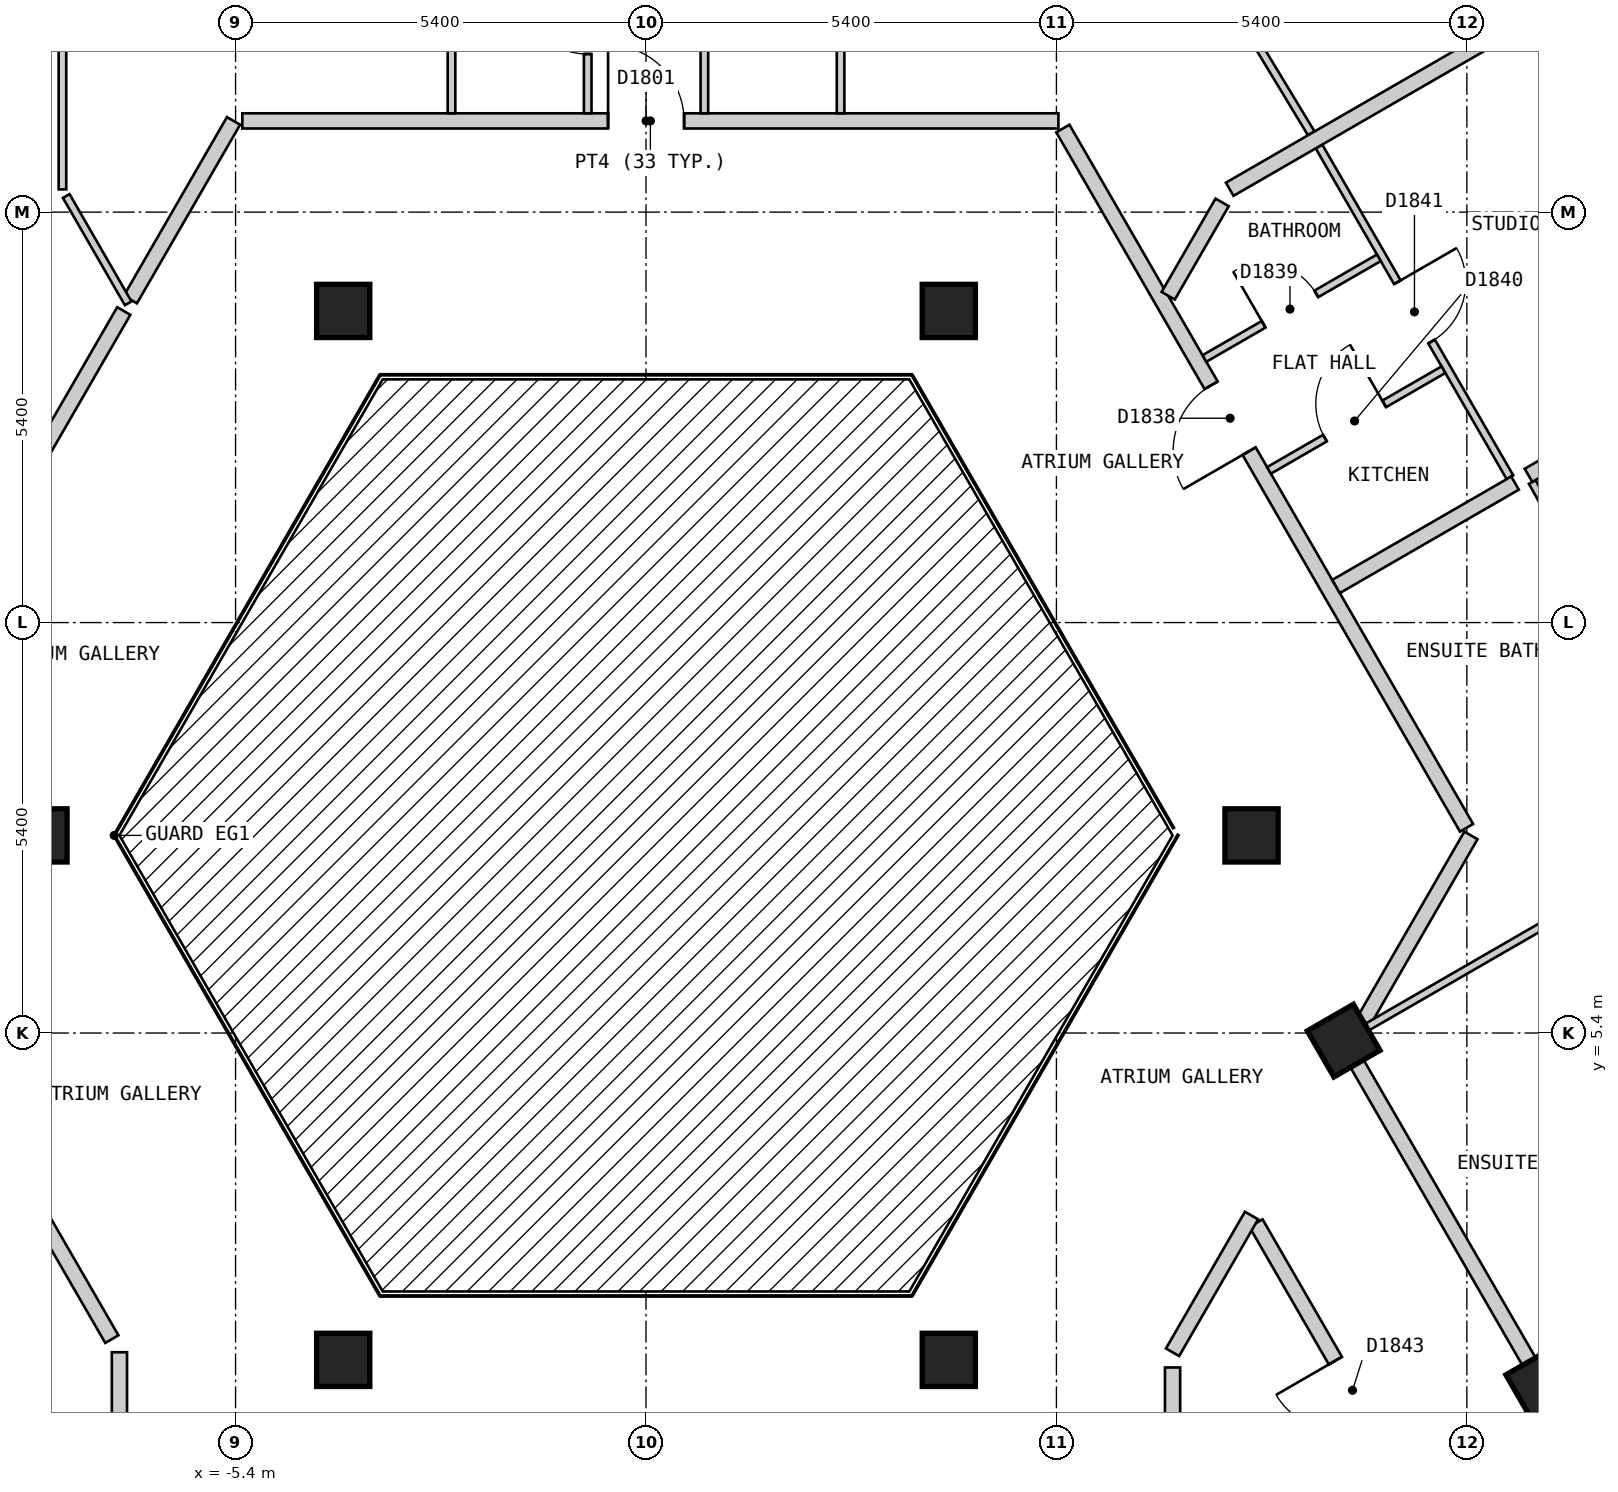
"""IFC4 building model, lengths in metres.
Left out: names, types, materials, properties, quantities, classifications, styles, units other than length and angle.
Written with IfcOpenShell. Run it as: python <this file> out.ifc"""

import sys

from ifc_helpers import new_model, si_unit, direction, frame, frame_2d, origin, origin_2d, place, context, subcontext, project, spatial, rectangle, extrude, element, fill, save


model = new_model("IFC4")
c1 = context("Model", 3, precision=1e-05, world=origin(), true_north=direction((0.0, 1.0)))
c2 = subcontext(c1, "Body", "Model", "MODEL_VIEW")
j1 = project(units=[si_unit("LENGTHUNIT", "METRE"), si_unit("PLANEANGLEUNIT", "RADIAN")], contexts=[c1])
p1 = place(None, origin())
s1 = spatial("IfcSite", under=j1, at=p1, CompositionType="ELEMENT")
p2 = place(p1, origin())
s2 = spatial("IfcBuilding", under=s1, at=p2, CompositionType="ELEMENT")
p3 = place(p2, frame((0.0, 0.0, 208.8)))
s3 = spatial("IfcBuildingStorey", under=s2, at=p3, CompositionType="ELEMENT", Elevation=208.8)
for number, where, z_axis, x_axis in (
    (1, (11.792, 0.775, 0.0), (0.0, 0.0, 1.0), (-0.5, 0.866, 0.0)),
    (2, (3.984, 1.1, 0.0), (0.0, 0.0, 1.0), (1.0, 0.0, 0.0)),
    (3, (9.179, 5.3, 0.0), (0.0, 0.0, 1.0), (-0.5, 0.866, 0.0)),
    (4, (7.967, 8.0, 0.0), (0.0, 0.0, 1.0), (1.0, 0.0, 0.0)),
    (5, (3.984, 14.9, 0.0), (0.0, 0.0, 1.0), (1.0, 0.0, 0.0)),
    (6, (-3.984, 14.9, 0.0), (0.0, 0.0, 1.0), (1.0, 0.0, 0.0)),
    (7, (-7.967, 8.0, 0.0), (0.0, 0.0, 1.0), (1.0, 0.0, 0.0)),
    (8, (-3.984, 1.1, 0.0), (0.0, 0.0, 1.0), (1.0, 0.0, 0.0)),
):
    element("IfcColumn", number, at=place(p3, frame(where, z_axis=z_axis, x_axis=x_axis)), inside=s3, PredefinedType="COLUMN", context=c2, shape_type="SweptSolid", body=[
        extrude(rectangle(XDim=0.7, YDim=0.7, at=origin_2d()), origin(), (0.0, 0.0, 1.0), 3.0),
    ])
p4 = place(p3, frame((-7.909, 2.898, 0.0), z_axis=(0.0, 0.0, 1.0), x_axis=(0.50019444547, -0.865913111531, 0.0)))
e9 = element("IfcWall", 9, at=p4, inside=s3, PredefinedType="PARTITIONING", context=c2, shape_type="SweptSolid", body=[
    extrude(rectangle(XDim=1.761, YDim=0.2, at=frame_2d((0.88, 0.0))), origin(), (0.0, 0.0, 1.0), 2.7),
])
p5 = place(p3, frame((8.026, 2.899, 0.0), z_axis=(0.0, 0.0, 1.0), x_axis=(0.499986018985, -0.866033475577, 0.0)))
e10 = element("IfcWall", 10, at=p5, inside=s3, PredefinedType="PARTITIONING", context=c2, shape_type="SweptSolid", body=[
    extrude(rectangle(XDim=5.078, YDim=0.2, at=frame_2d((2.539, 0.0))), origin(), (0.0, 0.0, 1.0), 2.7),
])
p6 = place(p5, frame((2.089, 0.0, 0.0)))
e11 = element("IfcOpeningElement", 11, at=p6, cuts=e10, PredefinedType="OPENING", context=c2, shape_type="SweptSolid", body=[
    extrude(rectangle(XDim=0.9, YDim=2.1, at=frame_2d((0.45, 1.05))), frame((0.0, 0.11, 0.0), z_axis=(0.0, -1.0, 0.0), x_axis=(1.0, 0.0, 0.0)), (0.0, 0.0, 1.0), 0.22),
])
p7 = place(p3, frame((9.238, 5.2, 0.0), z_axis=(0.0, 0.0, 1.0), x_axis=(0.500025705601, -0.86601056214, 0.0)))
e12 = element("IfcWall", 12, at=p7, inside=s3, PredefinedType="PARTITIONING", context=c2, shape_type="SweptSolid", body=[
    extrude(rectangle(XDim=7.735, YDim=0.2, at=frame_2d((3.868, 0.0))), origin(), (0.0, 0.0, 1.0), 2.7),
])
p8 = place(p3, frame((5.485, 17.3, 0.0), z_axis=(0.0, 0.0, 1.0), x_axis=(0.499943285704, -0.866058145322, 0.0)))
e13 = element("IfcWall", 13, at=p8, inside=s3, PredefinedType="PARTITIONING", context=c2, shape_type="SweptSolid", body=[
    extrude(rectangle(XDim=10.623, YDim=0.2, at=frame_2d((5.312, 0.0))), origin(), (0.0, 0.0, 1.0), 2.7),
])
p9 = place(p8, frame((3.901, 0.0, 0.0)))
e14 = element("IfcOpeningElement", 14, at=p9, cuts=e13, PredefinedType="OPENING", context=c2, shape_type="SweptSolid", body=[
    extrude(rectangle(XDim=1.0, YDim=2.1, at=frame_2d((0.5, 1.05))), frame((0.0, 0.11, 0.0), z_axis=(0.0, -1.0, 0.0), x_axis=(1.0, 0.0, 0.0)), (0.0, 0.0, 1.0), 0.22),
])
p10 = place(p3, frame((6.928, 1.0, 0.0), z_axis=(0.0, 0.0, 1.0), x_axis=(0.0, -1.0, 0.0)))
e15 = element("IfcWall", 15, at=p10, inside=s3, PredefinedType="PARTITIONING", context=c2, shape_type="SweptSolid", body=[
    extrude(rectangle(XDim=3.699, YDim=0.2, at=frame_2d((1.85, 0.0))), origin(), (0.0, 0.0, 1.0), 2.7),
])
p11 = place(p3, frame((-5.311, 17.4, 0.0), z_axis=(0.0, 0.0, 1.0), x_axis=(1.0, 0.0, 0.0)))
e16 = element("IfcWall", 16, at=p11, inside=s3, PredefinedType="PARTITIONING", context=c2, shape_type="SweptSolid", body=[
    extrude(rectangle(XDim=10.737, YDim=0.2, at=frame_2d((5.369, 0.0))), origin(), (0.0, 0.0, 1.0), 2.7),
])
p12 = place(p11, frame((4.812, 0.0, 0.0)))
e17 = element("IfcOpeningElement", 17, at=p12, cuts=e16, PredefinedType="OPENING", context=c2, shape_type="SweptSolid", body=[
    extrude(rectangle(XDim=1.0, YDim=2.1, at=frame_2d((0.5, 1.05))), frame((0.0, 0.11, 0.0), z_axis=(0.0, -1.0, 0.0), x_axis=(1.0, 0.0, 0.0)), (0.0, 0.0, 1.0), 0.22),
])
p13 = place(p3, frame((6.928, 1.2, 0.0), z_axis=(0.0, 0.0, 1.0), x_axis=(0.500132712588, 0.865948768577, 0.0)))
e18 = element("IfcWall", 18, at=p13, inside=s3, PredefinedType="PARTITIONING", context=c2, shape_type="SweptSolid", body=[
    extrude(rectangle(XDim=2.078, YDim=0.2, at=frame_2d((1.039, 0.0))), origin(), (0.0, 0.0, 1.0), 2.7),
])
p14 = place(p3, frame((9.404, 5.487, 0.0), z_axis=(0.0, 0.0, 1.0), x_axis=(0.499768590677, 0.866158966803, 0.0)))
e19 = element("IfcWall", 19, at=p14, inside=s3, PredefinedType="PARTITIONING", context=c2, shape_type="SweptSolid", body=[
    extrude(rectangle(XDim=2.901, YDim=0.2, at=frame_2d((1.451, 0.0))), origin(), (0.0, 0.0, 1.0), 2.7),
])
p15 = place(p3, frame((-10.826, 8.048, 0.0), z_axis=(0.0, 0.0, 1.0), x_axis=(0.499953104851, 0.866052477019, 0.0)))
e20 = element("IfcWall", 20, at=p15, inside=s3, PredefinedType="PARTITIONING", context=c2, shape_type="SweptSolid", body=[
    extrude(rectangle(XDim=7.91, YDim=0.2, at=frame_2d((3.955, 0.0))), origin(), (0.0, 0.0, 1.0), 2.7),
])
p16 = place(p15, frame((0.603, 0.0, 0.0)))
e21 = element("IfcOpeningElement", 21, at=p16, cuts=e20, PredefinedType="OPENING", context=c2, shape_type="SweptSolid", body=[
    extrude(rectangle(XDim=1.0, YDim=2.1, at=frame_2d((0.5, 1.05))), frame((0.0, 0.11, 0.0), z_axis=(0.0, -1.0, 0.0), x_axis=(1.0, 0.0, 0.0)), (0.0, 0.0, 1.0), 0.22),
])
p17 = place(p3, frame((-6.784, 15.05, 0.0), z_axis=(0.0, 0.0, 1.0), x_axis=(0.500067724834, 0.865986299303, 0.0)))
e22 = element("IfcWall", 22, at=p17, inside=s3, PredefinedType="PARTITIONING", context=c2, shape_type="SweptSolid", body=[
    extrude(rectangle(XDim=2.713, YDim=0.2, at=frame_2d((1.357, 0.0))), origin(), (0.0, 0.0, 1.0), 2.7),
])
p18 = place(p3, frame((-6.928, -2.799, 0.0), z_axis=(0.0, 0.0, 1.0), x_axis=(0.0, 1.0, 0.0)))
e23 = element("IfcWall", 23, at=p18, inside=s3, PredefinedType="PARTITIONING", context=c2, shape_type="SweptSolid", body=[
    extrude(rectangle(XDim=3.999, YDim=0.2, at=frame_2d((2.0, 0.0))), origin(), (0.0, 0.0, 1.0), 2.7),
])
p19 = place(p3, frame((7.033, 20.077, 0.0), z_axis=(0.0, 0.0, 1.0), x_axis=(0.517918779664, -0.855429797044, 0.0)))
e24 = element("IfcWall", 24, at=p19, inside=s3, PredefinedType="PARTITIONING", context=c2, shape_type="SweptSolid", body=[
    extrude(rectangle(XDim=3.321, YDim=0.1, at=frame_2d((1.661, 0.0))), origin(), (0.0, 0.0, 1.0), 2.7),
])
p20 = place(p3, frame((-7.628, 16.412, 0.0), z_axis=(0.0, 0.0, 1.0), x_axis=(0.499843439945, -0.866115774908, 0.0)))
e25 = element("IfcWall", 25, at=p20, inside=s3, PredefinedType="PARTITIONING", context=c2, shape_type="SweptSolid", body=[
    extrude(rectangle(XDim=1.63, YDim=0.1, at=frame_2d((0.815, 0.0))), origin(), (0.0, 0.0, 1.0), 2.7),
])
p21 = place(p3, frame((8.854, 17.064, 0.0), z_axis=(0.0, 0.0, 1.0), x_axis=(0.500042049778, -0.866001124973, 0.0)))
e26 = element("IfcWall", 26, at=p21, inside=s3, PredefinedType="PARTITIONING", context=c2, shape_type="SweptSolid", body=[
    extrude(rectangle(XDim=5.025, YDim=0.1, at=frame_2d((2.513, 0.0))), origin(), (0.0, 0.0, 1.0), 2.7),
])
p22 = place(p21, frame((2.063, 0.0, 0.0)))
e27 = element("IfcOpeningElement", 27, at=p22, cuts=e26, PredefinedType="OPENING", context=c2, shape_type="SweptSolid", body=[
    extrude(rectangle(XDim=0.9, YDim=2.1, at=frame_2d((0.45, 1.05))), frame((0.0, 0.06, 0.0), z_axis=(0.0, -1.0, 0.0), x_axis=(1.0, 0.0, 0.0)), (0.0, 0.0, 1.0), 0.12),
])
p23 = place(p3, frame((11.66, 12.65, 0.0), z_axis=(0.0, 0.0, 1.0), x_axis=(0.488650242737, -0.872479764965, 0.0)))
e28 = element("IfcWall", 28, at=p23, inside=s3, PredefinedType="PARTITIONING", context=c2, shape_type="SweptSolid", body=[
    extrude(rectangle(XDim=5.075, YDim=0.1, at=frame_2d((2.538, 0.0))), origin(), (0.0, 0.0, 1.0), 2.7),
])
p24 = place(p23, frame((2.113, 0.0, 0.0)))
e29 = element("IfcOpeningElement", 29, at=p24, cuts=e28, PredefinedType="OPENING", context=c2, shape_type="SweptSolid", body=[
    extrude(rectangle(XDim=0.8, YDim=2.1, at=frame_2d((0.4, 1.05))), frame((0.0, 0.06, 0.0), z_axis=(0.0, -1.0, 0.0), x_axis=(1.0, 0.0, 0.0)), (0.0, 0.0, 1.0), 0.12),
])
p25 = place(p3, frame((-2.559, 20.17, 0.0), z_axis=(0.0, 0.0, 1.0), x_axis=(0.0, -1.0, 0.0)))
e30 = element("IfcWall", 30, at=p25, inside=s3, PredefinedType="PARTITIONING", context=c2, shape_type="SweptSolid", body=[
    extrude(rectangle(XDim=2.67, YDim=0.1, at=frame_2d((1.335, 0.0))), origin(), (0.0, 0.0, 1.0), 2.7),
])
p26 = place(p3, frame((2.56, 20.03, 0.0), z_axis=(0.0, 0.0, 1.0), x_axis=(0.0, -1.0, 0.0)))
e31 = element("IfcWall", 31, at=p26, inside=s3, PredefinedType="PARTITIONING", context=c2, shape_type="SweptSolid", body=[
    extrude(rectangle(XDim=2.53, YDim=0.1, at=frame_2d((1.265, 0.0))), origin(), (0.0, 0.0, 1.0), 2.7),
])
p27 = place(p3, frame((0.768, 17.5, 0.0), z_axis=(0.0, 0.0, 1.0), x_axis=(0.0, 1.0, 0.0)))
e32 = element("IfcWall", 32, at=p27, inside=s3, PredefinedType="PARTITIONING", context=c2, shape_type="SweptSolid", body=[
    extrude(rectangle(XDim=2.51, YDim=0.1, at=frame_2d((1.255, 0.0))), origin(), (0.0, 0.0, 1.0), 2.7),
])
p28 = place(p27, frame((0.83, 0.0, 0.0)))
e33 = element("IfcOpeningElement", 33, at=p28, cuts=e32, PredefinedType="OPENING", context=c2, shape_type="SweptSolid", body=[
    extrude(rectangle(XDim=0.8, YDim=2.1, at=frame_2d((0.4, 1.05))), frame((0.0, 0.06, 0.0), z_axis=(0.0, -1.0, 0.0), x_axis=(1.0, 0.0, 0.0)), (0.0, 0.0, 1.0), 0.12),
])
p29 = place(p3, frame((-7.678, 16.499, 0.0), z_axis=(0.0, 0.0, 1.0), x_axis=(0.0, 1.0, 0.0)))
e34 = element("IfcWall", 34, at=p29, inside=s3, PredefinedType="PARTITIONING", context=c2, shape_type="SweptSolid", body=[
    extrude(rectangle(XDim=5.801, YDim=0.1, at=frame_2d((2.9, 0.0))), origin(), (0.0, 0.0, 1.0), 2.7),
])
p30 = place(p29, frame((3.44, 0.0, 0.0)))
e35 = element("IfcOpeningElement", 35, at=p30, cuts=e34, PredefinedType="OPENING", context=c2, shape_type="SweptSolid", body=[
    extrude(rectangle(XDim=0.9, YDim=2.1, at=frame_2d((0.45, 1.05))), frame((0.0, 0.06, 0.0), z_axis=(0.0, -1.0, 0.0), x_axis=(1.0, 0.0, 0.0)), (0.0, 0.0, 1.0), 0.12),
])
p31 = place(p3, frame((-0.767, 17.5, 0.0), z_axis=(0.0, 0.0, 1.0), x_axis=(0.0, 1.0, 0.0)))
e36 = element("IfcWall", 36, at=p31, inside=s3, PredefinedType="PARTITIONING", context=c2, shape_type="SweptSolid", body=[
    extrude(rectangle(XDim=2.559, YDim=0.1, at=frame_2d((1.28, 0.0))), origin(), (0.0, 0.0, 1.0), 2.7),
])
p32 = place(p31, frame((0.78, 0.0, 0.0)))
e37 = element("IfcOpeningElement", 37, at=p32, cuts=e36, PredefinedType="OPENING", context=c2, shape_type="SweptSolid", body=[
    extrude(rectangle(XDim=0.9, YDim=2.1, at=frame_2d((0.45, 1.05))), frame((0.0, 0.06, 0.0), z_axis=(0.0, -1.0, 0.0), x_axis=(1.0, 0.0, 0.0)), (0.0, 0.0, 1.0), 0.12),
])
p33 = place(p3, frame((9.354, 5.401, 0.0), z_axis=(0.0, 0.0, 1.0), x_axis=(0.866018411306, 0.500012111133, 0.0)))
e38 = element("IfcWall", 38, at=p33, inside=s3, PredefinedType="PARTITIONING", context=c2, shape_type="SweptSolid", body=[
    extrude(rectangle(XDim=9.898, YDim=0.1, at=frame_2d((4.949, 0.0))), origin(), (0.0, 0.0, 1.0), 2.7),
])
p34 = place(p33, frame((7.277, 0.0, 0.0)))
e39 = element("IfcOpeningElement", 39, at=p34, cuts=e38, PredefinedType="OPENING", context=c2, shape_type="SweptSolid", body=[
    extrude(rectangle(XDim=0.9, YDim=2.1, at=frame_2d((0.45, 1.05))), frame((0.0, 0.06, 0.0), z_axis=(0.0, -1.0, 0.0), x_axis=(1.0, 0.0, 0.0)), (0.0, 0.0, 1.0), 0.12),
])
p35 = place(p3, frame((8.197, 12.802, 0.0), z_axis=(0.0, 0.0, 1.0), x_axis=(0.866029095148, 0.499993606316, 0.0)))
e40 = element("IfcWall", 40, at=p35, inside=s3, PredefinedType="PARTITIONING", context=c2, shape_type="SweptSolid", body=[
    extrude(rectangle(XDim=2.65, YDim=0.1, at=frame_2d((1.325, 0.0))), origin(), (0.0, 0.0, 1.0), 2.7),
])
p36 = place(p35, frame((0.85, 0.0, 0.0)))
e41 = element("IfcOpeningElement", 41, at=p36, cuts=e40, PredefinedType="OPENING", context=c2, shape_type="SweptSolid", body=[
    extrude(rectangle(XDim=0.9, YDim=2.1, at=frame_2d((0.45, 1.05))), frame((0.0, 0.06, 0.0), z_axis=(0.0, -1.0, 0.0), x_axis=(1.0, 0.0, 0.0)), (0.0, 0.0, 1.0), 0.12),
])
p37 = place(p3, frame((7.347, 14.274, 0.0), z_axis=(0.0, 0.0, 1.0), x_axis=(0.86601223543, 0.500022807565, 0.0)))
e42 = element("IfcWall", 42, at=p37, inside=s3, PredefinedType="PARTITIONING", context=c2, shape_type="SweptSolid", body=[
    extrude(rectangle(XDim=2.65, YDim=0.1, at=frame_2d((1.325, 0.0))), origin(), (0.0, 0.0, 1.0), 2.7),
])
p38 = place(p37, frame((0.9, 0.0, 0.0)))
e43 = element("IfcOpeningElement", 43, at=p38, cuts=e42, PredefinedType="OPENING", context=c2, shape_type="SweptSolid", body=[
    extrude(rectangle(XDim=0.8, YDim=2.1, at=frame_2d((0.4, 1.05))), frame((0.0, 0.06, 0.0), z_axis=(0.0, -1.0, 0.0), x_axis=(1.0, 0.0, 0.0)), (0.0, 0.0, 1.0), 0.12),
])
p39 = place(p3, frame((6.871, 15.1, 0.0), z_axis=(0.0, 0.0, 1.0), x_axis=(0.50006528296, 0.865987709369, 0.0)))
e44 = element("IfcWall", 44, at=p39, inside=s3, PredefinedType="PARTITIONING", context=c2, shape_type="SweptSolid", body=[
    extrude(rectangle(XDim=1.418, YDim=0.2, at=frame_2d((0.709, 0.0))), origin(), (0.0, 0.0, 1.0), 2.7),
])
p40 = place(p3, frame((9.079, 11.275, 0.0), z_axis=(0.0, 0.0, 1.0), x_axis=(0.865952340496, 0.500126527981, 0.0)))
e45 = element("IfcWall", 45, at=p40, inside=s3, PredefinedType="PARTITIONING", context=c2, shape_type="SweptSolid", body=[
    extrude(rectangle(XDim=2.719, YDim=0.2, at=frame_2d((1.36, 0.0))), origin(), (0.0, 0.0, 1.0), 2.7),
])
p41 = place(p3, frame((11.611, 12.737, 0.0), z_axis=(0.0, 0.0, 1.0), x_axis=(0.866017282483, 0.500014066243, 0.0)))
e46 = element("IfcWall", 46, at=p41, inside=s3, PredefinedType="PARTITIONING", context=c2, shape_type="SweptSolid", body=[
    extrude(rectangle(XDim=4.276, YDim=0.2, at=frame_2d((2.138, 0.0))), origin(), (0.0, 0.0, 1.0), 2.7),
])
p42 = place(p3, frame((7.68, 16.501, 0.0), z_axis=(0.0, 0.0, 1.0), x_axis=(0.86602149507, 0.500006770031, 0.0)))
e47 = element("IfcWall", 47, at=p42, inside=s3, PredefinedType="PARTITIONING", context=c2, shape_type="SweptSolid", body=[
    extrude(rectangle(XDim=5.798, YDim=0.2, at=frame_2d((2.899, 0.0))), origin(), (0.0, 0.0, 1.0), 2.7),
])
p43 = place(p3, frame((-11.417, 12.625, 0.0), z_axis=(0.0, 0.0, 1.0), x_axis=(0.500007885066, 0.866020851292, 0.0)))
e48 = element("IfcWall", 48, at=p43, inside=s3, PredefinedType="PARTITIONING", context=c2, shape_type="SweptSolid", body=[
    extrude(rectangle(XDim=7.33, YDim=0.1, at=frame_2d((3.665, 0.0))), origin(), (0.0, 0.0, 1.0), 2.7),
])
p44 = place(p43, frame((3.328, 0.0, 0.0)))
e49 = element("IfcOpeningElement", 49, at=p44, cuts=e48, PredefinedType="OPENING", context=c2, shape_type="SweptSolid", body=[
    extrude(rectangle(XDim=0.8, YDim=2.1, at=frame_2d((0.4, 1.05))), frame((0.0, 0.06, 0.0), z_axis=(0.0, -1.0, 0.0), x_axis=(1.0, 0.0, 0.0)), (0.0, 0.0, 1.0), 0.12),
])
p45 = place(p12, origin())
e50 = element("IfcDoor", 50, at=p45, inside=s3, OperationType="SINGLE_SWING_LEFT", PredefinedType="DOOR", context=c2, shape_type="SweptSolid", body=[
    extrude(rectangle(XDim=1.0, YDim=2.1, at=frame_2d((0.5, 1.05))), frame((0.0, 0.025, 0.0), z_axis=(0.0, -1.0, 0.0), x_axis=(1.0, 0.0, 0.0)), (0.0, 0.0, 1.0), 0.05),
])
fill(e17, e50)
p46 = place(p32, origin())
e51 = element("IfcDoor", 51, at=p46, inside=s3, OperationType="SINGLE_SWING_RIGHT", PredefinedType="DOOR", context=c2, shape_type="SweptSolid", body=[
    extrude(rectangle(XDim=0.9, YDim=2.1, at=frame_2d((0.45, 1.05))), frame((0.0, 0.025, 0.0), z_axis=(0.0, -1.0, 0.0), x_axis=(1.0, 0.0, 0.0)), (0.0, 0.0, 1.0), 0.05),
])
fill(e37, e51)
p47 = place(p9, origin())
e52 = element("IfcDoor", 52, at=p47, inside=s3, OperationType="SINGLE_SWING_RIGHT", PredefinedType="DOOR", context=c2, shape_type="SweptSolid", body=[
    extrude(rectangle(XDim=1.0, YDim=2.1, at=frame_2d((0.5, 1.05))), frame((0.0, 0.025, 0.0), z_axis=(0.0, -1.0, 0.0), x_axis=(1.0, 0.0, 0.0)), (0.0, 0.0, 1.0), 0.05),
])
fill(e14, e52)
p48 = place(p38, origin())
e53 = element("IfcDoor", 53, at=p48, inside=s3, OperationType="SINGLE_SWING_LEFT", PredefinedType="DOOR", context=c2, shape_type="SweptSolid", body=[
    extrude(rectangle(XDim=0.8, YDim=2.1, at=frame_2d((0.4, 1.05))), frame((0.0, 0.025, 0.0), z_axis=(0.0, -1.0, 0.0), x_axis=(1.0, 0.0, 0.0)), (0.0, 0.0, 1.0), 0.05),
])
fill(e43, e53)
p49 = place(p36, origin())
e54 = element("IfcDoor", 54, at=p49, inside=s3, OperationType="SINGLE_SWING_RIGHT", PredefinedType="DOOR", context=c2, shape_type="SweptSolid", body=[
    extrude(rectangle(XDim=0.9, YDim=2.1, at=frame_2d((0.45, 1.05))), frame((0.0, 0.025, 0.0), z_axis=(0.0, -1.0, 0.0), x_axis=(1.0, 0.0, 0.0)), (0.0, 0.0, 1.0), 0.05),
])
fill(e41, e54)
p50 = place(p22, origin())
e55 = element("IfcDoor", 55, at=p50, inside=s3, OperationType="SINGLE_SWING_LEFT", PredefinedType="DOOR", context=c2, shape_type="SweptSolid", body=[
    extrude(rectangle(XDim=0.9, YDim=2.1, at=frame_2d((0.45, 1.05))), frame((0.0, 0.025, 0.0), z_axis=(0.0, -1.0, 0.0), x_axis=(1.0, 0.0, 0.0)), (0.0, 0.0, 1.0), 0.05),
])
fill(e27, e55)
p51 = place(p6, origin())
e56 = element("IfcDoor", 56, at=p51, inside=s3, OperationType="SINGLE_SWING_LEFT", PredefinedType="DOOR", context=c2, shape_type="SweptSolid", body=[
    extrude(rectangle(XDim=0.9, YDim=2.1, at=frame_2d((0.45, 1.05))), frame((0.0, 0.025, 0.0), z_axis=(0.0, -1.0, 0.0), x_axis=(1.0, 0.0, 0.0)), (0.0, 0.0, 1.0), 0.05),
])
fill(e11, e56)
save(model, sys.argv[1])
